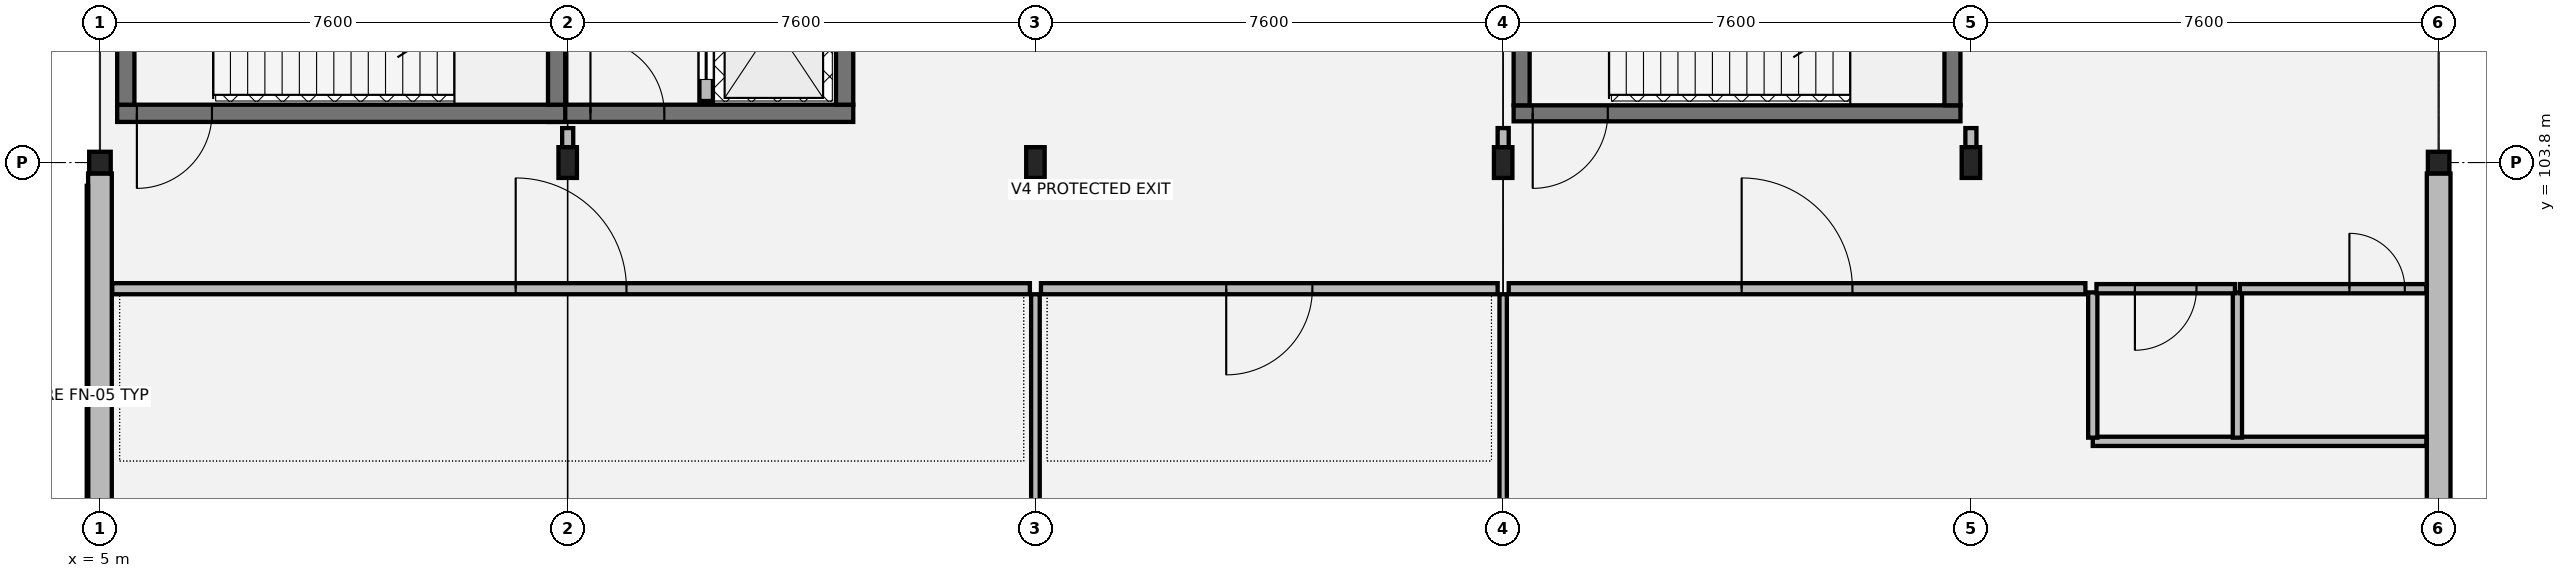
"""IFC4 building model, lengths in metres.
Left out: names, types, materials, properties, quantities, classifications, styles, units other than length and angle.
Written with IfcOpenShell. Run it as: python <this file> out.ifc"""

import sys

from ifc_helpers import new_model, si_unit, direction, frame, frame_2d, origin, origin_2d, place, context, subcontext, project, spatial, rectangle, hollow_rectangle, i_section, extrude, element, fill, save


model = new_model("IFC4")
c1 = context("Model", 3, precision=1e-05, world=origin(), true_north=direction((0.0, 1.0)))
c2 = subcontext(c1, "Body", "Model", "MODEL_VIEW")
j1 = project(units=[si_unit("LENGTHUNIT", "METRE"), si_unit("PLANEANGLEUNIT", "RADIAN")], contexts=[c1])
p1 = place(None, origin())
s1 = spatial("IfcSite", under=j1, at=p1, CompositionType="ELEMENT")
p2 = place(p1, origin())
s2 = spatial("IfcBuilding", under=s1, at=p2, CompositionType="ELEMENT")
p3 = place(p2, origin())
s3 = spatial("IfcBuildingStorey", under=s2, at=p3, CompositionType="ELEMENT", Elevation=0.0)
p4 = place(p3, frame((5.0, 103.8, 0.0), z_axis=(0.0, 0.0, 1.0), x_axis=(1.0, 0.0, 0.0)))
e1 = element("IfcColumn", 1, at=p4, inside=s3, PredefinedType="COLUMN", context=c2, shape_type="SweptSolid", body=[
    extrude(hollow_rectangle(XDim=0.35, YDim=0.35, WallThickness=0.014, at=origin_2d()), origin(), (0.0, 0.0, 1.0), 5.075),
])
for number, where, z_axis, x_axis in (
    (2, (12.6, 103.8, 0.0), (0.0, 0.0, 1.0), (1.0, 0.0, 0.0)),
    (3, (20.2, 103.8, 0.0), (0.0, 0.0, 1.0), (1.0, 0.0, 0.0)),
    (4, (27.8, 103.8, 0.0), (0.0, 0.0, 1.0), (1.0, 0.0, 0.0)),
    (5, (35.4, 103.8, 0.0), (0.0, 0.0, 1.0), (1.0, 0.0, 0.0)),
):
    element("IfcColumn", number, at=place(p3, frame(where, z_axis=z_axis, x_axis=x_axis)), inside=s3, PredefinedType="COLUMN", context=c2, shape_type="SweptSolid", body=[
        extrude(i_section(OverallWidth=0.3, OverallDepth=0.5, WebThickness=0.014, FlangeThickness=0.028, at=origin_2d()), origin(), (0.0, 0.0, 1.0), 5.075),
    ])
p5 = place(p3, frame((43.0, 103.8, 0.0), z_axis=(0.0, 0.0, 1.0), x_axis=(1.0, 0.0, 0.0)))
e6 = element("IfcColumn", 6, at=p5, inside=s3, PredefinedType="COLUMN", context=c2, shape_type="SweptSolid", body=[
    extrude(hollow_rectangle(XDim=0.35, YDim=0.35, WallThickness=0.014, at=origin_2d()), origin(), (0.0, 0.0, 1.0), 5.075),
])
for number, where, z_axis, x_axis in (
    (7, (43.0, 96.378, 0.0), (0.0, 0.0, 1.0), (0.0, 1.0, 0.0)),
    (8, (5.0, 103.622, 0.0), (0.0, 0.0, 1.0), (0.0, -1.0, 0.0)),
):
    element("IfcWall", number, at=place(p3, frame(where, z_axis=z_axis, x_axis=x_axis)), inside=s3, PredefinedType="SOLIDWALL", context=c2, shape_type="SweptSolid", body=[
        extrude(rectangle(XDim=7.244, YDim=0.385, at=frame_2d((3.622, 0.0))), origin(), (0.0, 0.0, 1.0), 4.5),
    ])
p6 = place(p3, frame((12.28, 104.6, 0.0), z_axis=(0.0, 0.0, 1.0), x_axis=(1.0, 0.0, 0.0)))
e9 = element("IfcWall", 9, at=p6, inside=s3, PredefinedType="SHEAR", context=c2, shape_type="SweptSolid", body=[
    extrude(rectangle(XDim=4.96, YDim=0.28, at=frame_2d((2.48, 0.0))), origin(), (0.0, 0.0, 1.0), 4.865),
])
p7 = place(p6, frame((0.69, 0.0, 0.0)))
e10 = element("IfcOpeningElement", 10, at=p7, cuts=e9, PredefinedType="OPENING", context=c2, shape_type="SweptSolid", body=[
    extrude(rectangle(XDim=1.2, YDim=2.16, at=frame_2d((0.6, 1.08))), frame((0.0, 0.15, 0.0), z_axis=(0.0, -1.0, 0.0), x_axis=(1.0, 0.0, 0.0)), (0.0, 0.0, 1.0), 0.3),
])
p8 = place(p3, frame((17.1, 104.74, 0.0), z_axis=(0.0, 0.0, 1.0), x_axis=(0.0, 1.0, 0.0)))
e11 = element("IfcWall", 11, at=p8, inside=s3, PredefinedType="SHEAR", context=c2, shape_type="SweptSolid", body=[
    extrude(rectangle(XDim=5.72, YDim=0.28, at=frame_2d((2.86, 0.0))), origin(), (0.0, 0.0, 1.0), 4.865),
])
p9 = place(p3, frame((14.85, 104.8, 0.0), z_axis=(0.0, 0.0, 1.0), x_axis=(0.0, 1.0, 0.0)))
e12 = element("IfcWall", 12, at=p9, inside=s3, PredefinedType="SOLIDWALL", context=c2, shape_type="SweptSolid", body=[
    extrude(rectangle(XDim=5.6, YDim=0.22, at=frame_2d((2.8, 0.0))), origin(), (0.0, 0.0, 1.0), 4.865),
])
p10 = place(p9, frame((0.35, 0.0, 0.0)))
e13 = element("IfcOpeningElement", 13, at=p10, cuts=e12, PredefinedType="OPENING", context=c2, shape_type="SweptSolid", body=[
    extrude(rectangle(XDim=1.1, YDim=2.15, at=frame_2d((0.55, 1.075))), frame((0.0, 0.12, 0.0), z_axis=(0.0, -1.0, 0.0), x_axis=(1.0, 0.0, 0.0)), (0.0, 0.0, 1.0), 0.24),
])
p11 = place(p3, frame((5.28, 104.6, 0.0), z_axis=(0.0, 0.0, 1.0), x_axis=(1.0, 0.0, 0.0)))
e14 = element("IfcWall", 14, at=p11, inside=s3, PredefinedType="SHEAR", context=c2, shape_type="SweptSolid", body=[
    extrude(rectangle(XDim=7.28, YDim=0.28, at=frame_2d((3.64, 0.0))), origin(), (0.0, 0.0, 1.0), 4.865),
])
p12 = place(p11, frame((0.32, 0.0, 0.0)))
e15 = element("IfcOpeningElement", 15, at=p12, cuts=e14, PredefinedType="OPENING", context=c2, shape_type="SweptSolid", body=[
    extrude(rectangle(XDim=1.22, YDim=2.18, at=frame_2d((0.61, 1.09))), frame((0.0, 0.15, 0.0), z_axis=(0.0, -1.0, 0.0), x_axis=(1.0, 0.0, 0.0)), (0.0, 0.0, 1.0), 0.3),
])
for number, where, z_axis, x_axis in (
    (16, (5.42, 104.74, 0.0), (0.0, 0.0, 1.0), (0.0, 1.0, 0.0)),
    (17, (12.42, 104.74, 0.0), (0.0, 0.0, 1.0), (0.0, 1.0, 0.0)),
):
    element("IfcWall", number, at=place(p3, frame(where, z_axis=z_axis, x_axis=x_axis)), inside=s3, PredefinedType="SHEAR", context=c2, shape_type="SweptSolid", body=[
        extrude(rectangle(XDim=5.72, YDim=0.28, at=frame_2d((2.86, 0.0))), origin(), (0.0, 0.0, 1.0), 4.865),
    ])
p13 = place(p3, frame((27.97, 104.6, 0.0), z_axis=(0.0, 0.0, 1.0), x_axis=(1.0, 0.0, 0.0)))
e18 = element("IfcWall", 18, at=p13, inside=s3, PredefinedType="SHEAR", context=c2, shape_type="SweptSolid", body=[
    extrude(rectangle(XDim=7.26, YDim=0.26, at=frame_2d((3.63, 0.0))), origin(), (0.0, 0.0, 1.0), 4.865),
])
p14 = place(p13, frame((0.31, 0.0, 0.0)))
e19 = element("IfcOpeningElement", 19, at=p14, cuts=e18, PredefinedType="OPENING", context=c2, shape_type="SweptSolid", body=[
    extrude(rectangle(XDim=1.22, YDim=2.18, at=frame_2d((0.61, 1.09))), frame((0.0, 0.14, 0.0), z_axis=(0.0, -1.0, 0.0), x_axis=(1.0, 0.0, 0.0)), (0.0, 0.0, 1.0), 0.28),
])
for number, where, z_axis, x_axis in (
    (20, (28.1, 104.73, 0.0), (0.0, 0.0, 1.0), (0.0, 1.0, 0.0)),
    (21, (35.1, 104.73, 0.0), (0.0, 0.0, 1.0), (0.0, 1.0, 0.0)),
):
    element("IfcWall", number, at=place(p3, frame(where, z_axis=z_axis, x_axis=x_axis)), inside=s3, PredefinedType="SHEAR", context=c2, shape_type="SweptSolid", body=[
        extrude(rectangle(XDim=5.74, YDim=0.26, at=frame_2d((2.87, 0.0))), origin(), (0.0, 0.0, 1.0), 4.865),
    ])
p15 = place(p3, frame((37.38, 99.27, 0.0), z_axis=(0.0, 0.0, 1.0), x_axis=(1.0, 0.0, 0.0)))
e22 = element("IfcWall", 22, at=p15, inside=s3, PredefinedType="PARTITIONING", context=c2, shape_type="SweptSolid", body=[
    extrude(rectangle(XDim=5.42, YDim=0.15, at=frame_2d((2.71, 0.0))), origin(), (0.0, 0.0, 1.0), 4.2),
])
for number, where, z_axis, x_axis in (
    (23, (37.38, 99.33, 0.0), (0.0, 0.0, 1.0), (0.0, 1.0, 0.0)),
    (24, (39.73, 99.33, 0.0), (0.0, 0.0, 1.0), (0.0, 1.0, 0.0)),
):
    element("IfcWall", number, at=place(p3, frame(where, z_axis=z_axis, x_axis=x_axis)), inside=s3, PredefinedType="PARTITIONING", context=c2, shape_type="SweptSolid", body=[
        extrude(rectangle(XDim=2.36, YDim=0.15, at=frame_2d((1.18, 0.0))), origin(), (0.0, 0.0, 1.0), 4.2),
    ])
p16 = place(p3, frame((37.44, 101.75, 0.0), z_axis=(0.0, 0.0, 1.0), x_axis=(1.0, 0.0, 0.0)))
e25 = element("IfcWall", 25, at=p16, inside=s3, PredefinedType="PARTITIONING", context=c2, shape_type="SweptSolid", body=[
    extrude(rectangle(XDim=2.25, YDim=0.15, at=frame_2d((1.125, 0.0))), origin(), (0.0, 0.0, 1.0), 4.2),
])
p17 = place(p16, frame((0.625, 0.0, 0.0)))
e26 = element("IfcOpeningElement", 26, at=p17, cuts=e25, PredefinedType="OPENING", context=c2, shape_type="SweptSolid", body=[
    extrude(rectangle(XDim=1.0, YDim=2.15, at=frame_2d((0.5, 1.075))), frame((0.0, 0.085, 0.0), z_axis=(0.0, -1.0, 0.0), x_axis=(1.0, 0.0, 0.0)), (0.0, 0.0, 1.0), 0.17),
])
p18 = place(p3, frame((39.77, 101.75, 0.0), z_axis=(0.0, 0.0, 1.0), x_axis=(1.0, 0.0, 0.0)))
e27 = element("IfcWall", 27, at=p18, inside=s3, PredefinedType="PARTITIONING", context=c2, shape_type="SweptSolid", body=[
    extrude(rectangle(XDim=3.03, YDim=0.15, at=frame_2d((1.515, 0.0))), origin(), (0.0, 0.0, 1.0), 4.2),
])
p19 = place(p18, frame((1.78, 0.0, 0.0)))
e28 = element("IfcOpeningElement", 28, at=p19, cuts=e27, PredefinedType="OPENING", context=c2, shape_type="SweptSolid", body=[
    extrude(rectangle(XDim=0.9, YDim=2.15, at=frame_2d((0.45, 1.075))), frame((0.0, 0.085, 0.0), z_axis=(0.0, -1.0, 0.0), x_axis=(1.0, 0.0, 0.0)), (0.0, 0.0, 1.0), 0.17),
])
p20 = place(p3, frame((5.2, 101.75, 0.0), z_axis=(0.0, 0.0, 1.0), x_axis=(1.0, 0.0, 0.0)))
e29 = element("IfcWall", 29, at=p20, inside=s3, PredefinedType="PARTITIONING", context=c2, shape_type="SweptSolid", body=[
    extrude(rectangle(XDim=14.91, YDim=0.18, at=frame_2d((7.455, 0.0))), origin(), (0.0, 0.0, 1.0), 4.2),
])
p21 = place(p20, frame((6.555, 0.0, 0.0)))
e30 = element("IfcOpeningElement", 30, at=p21, cuts=e29, PredefinedType="OPENING", context=c2, shape_type="SweptSolid", body=[
    extrude(rectangle(XDim=1.8, YDim=2.3, at=frame_2d((0.9, 1.15))), frame((0.0, 0.1, 0.0), z_axis=(0.0, -1.0, 0.0), x_axis=(1.0, 0.0, 0.0)), (0.0, 0.0, 1.0), 0.2),
])
p22 = place(p3, frame((20.29, 101.75, 0.0), z_axis=(0.0, 0.0, 1.0), x_axis=(1.0, 0.0, 0.0)))
e31 = element("IfcWall", 31, at=p22, inside=s3, PredefinedType="PARTITIONING", context=c2, shape_type="SweptSolid", body=[
    extrude(rectangle(XDim=7.42, YDim=0.18, at=frame_2d((3.71, 0.0))), origin(), (0.0, 0.0, 1.0), 4.2),
])
p23 = place(p22, frame((3.01, 0.0, 0.0)))
e32 = element("IfcOpeningElement", 32, at=p23, cuts=e31, PredefinedType="OPENING", context=c2, shape_type="SweptSolid", body=[
    extrude(rectangle(XDim=1.4, YDim=2.22, at=frame_2d((0.7, 1.11))), frame((0.0, 0.1, 0.0), z_axis=(0.0, -1.0, 0.0), x_axis=(1.0, 0.0, 0.0)), (0.0, 0.0, 1.0), 0.2),
])
p24 = place(p3, frame((27.89, 101.75, 0.0), z_axis=(0.0, 0.0, 1.0), x_axis=(1.0, 0.0, 0.0)))
e33 = element("IfcWall", 33, at=p24, inside=s3, PredefinedType="PARTITIONING", context=c2, shape_type="SweptSolid", body=[
    extrude(rectangle(XDim=9.37, YDim=0.18, at=frame_2d((4.685, 0.0))), origin(), (0.0, 0.0, 1.0), 4.2),
])
p25 = place(p24, frame((3.785, 0.0, 0.0)))
e34 = element("IfcOpeningElement", 34, at=p25, cuts=e33, PredefinedType="OPENING", context=c2, shape_type="SweptSolid", body=[
    extrude(rectangle(XDim=1.8, YDim=2.3, at=frame_2d((0.9, 1.15))), frame((0.0, 0.1, 0.0), z_axis=(0.0, -1.0, 0.0), x_axis=(1.0, 0.0, 0.0)), (0.0, 0.0, 1.0), 0.2),
])
for number, where, z_axis, x_axis in (
    (35, (12.6, 104.04, 0.0), (0.0, 0.0, 1.0), (0.0, 1.0, 0.0)),
    (36, (27.8, 104.04, 0.0), (0.0, 0.0, 1.0), (0.0, 1.0, 0.0)),
    (37, (35.4, 104.04, 0.0), (0.0, 0.0, 1.0), (0.0, 1.0, 0.0)),
):
    element("IfcWall", number, at=place(p3, frame(where, z_axis=z_axis, x_axis=x_axis)), inside=s3, PredefinedType="PARTITIONING", context=c2, shape_type="SweptSolid", body=[
        extrude(rectangle(XDim=0.32, YDim=0.18, at=frame_2d((0.16, 0.0))), origin(), (0.0, 0.0, 1.0), 4.2),
    ])
p26 = place(p3, frame((20.2, 73.72, 0.0), z_axis=(0.0, 0.0, 1.0), x_axis=(0.0, 1.0, 0.0)))
e38 = element("IfcWall", 38, at=p26, inside=s3, PredefinedType="PARTITIONING", context=c2, shape_type="SweptSolid", body=[
    extrude(rectangle(XDim=27.94, YDim=0.14, at=frame_2d((13.97, 0.0))), origin(), (0.0, 0.0, 1.0), 4.2),
])
p27 = place(p3, frame((27.8, 73.72, 0.0), z_axis=(0.0, 0.0, 1.0), x_axis=(0.0, 1.0, 0.0)))
e39 = element("IfcWall", 39, at=p27, inside=s3, PredefinedType="PARTITIONING", context=c2, shape_type="SweptSolid", body=[
    extrude(rectangle(XDim=27.94, YDim=0.12, at=frame_2d((13.97, 0.0))), origin(), (0.0, 0.0, 1.0), 4.2),
])
p28 = place(p7, origin())
e40 = element("IfcDoor", 40, at=p28, inside=s3, OperationType="SINGLE_SWING_LEFT", PredefinedType="DOOR", context=c2, shape_type="SweptSolid", body=[
    extrude(rectangle(XDim=1.2, YDim=2.16, at=frame_2d((0.6, 1.08))), frame((0.0, 0.025, 0.0), z_axis=(0.0, -1.0, 0.0), x_axis=(1.0, 0.0, 0.0)), (0.0, 0.0, 1.0), 0.05),
])
fill(e10, e40)
p29 = place(p10, origin())
e41 = element("IfcDoor", 41, at=p29, inside=s3, OperationType="SLIDING_TO_LEFT", PredefinedType="DOOR", context=c2, shape_type="SweptSolid", body=[
    extrude(rectangle(XDim=1.1, YDim=2.15, at=frame_2d((0.55, 1.075))), frame((0.0, 0.025, 0.0), z_axis=(0.0, -1.0, 0.0), x_axis=(1.0, 0.0, 0.0)), (0.0, 0.0, 1.0), 0.05),
])
fill(e13, e41)
p30 = place(p12, origin())
e42 = element("IfcDoor", 42, at=p30, inside=s3, OperationType="SINGLE_SWING_RIGHT", PredefinedType="DOOR", context=c2, shape_type="SweptSolid", body=[
    extrude(rectangle(XDim=1.22, YDim=2.18, at=frame_2d((0.61, 1.09))), frame((0.0, 0.025, 0.0), z_axis=(0.0, -1.0, 0.0), x_axis=(1.0, 0.0, 0.0)), (0.0, 0.0, 1.0), 0.05),
])
fill(e15, e42)
p31 = place(p14, origin())
e43 = element("IfcDoor", 43, at=p31, inside=s3, OperationType="SINGLE_SWING_RIGHT", PredefinedType="DOOR", context=c2, shape_type="SweptSolid", body=[
    extrude(rectangle(XDim=1.22, YDim=2.18, at=frame_2d((0.61, 1.09))), frame((0.0, 0.025, 0.0), z_axis=(0.0, -1.0, 0.0), x_axis=(1.0, 0.0, 0.0)), (0.0, 0.0, 1.0), 0.05),
])
fill(e19, e43)
p32 = place(p17, origin())
e44 = element("IfcDoor", 44, at=p32, inside=s3, OperationType="SINGLE_SWING_RIGHT", PredefinedType="DOOR", context=c2, shape_type="SweptSolid", body=[
    extrude(rectangle(XDim=1.0, YDim=2.15, at=frame_2d((0.5, 1.075))), frame((0.0, 0.025, 0.0), z_axis=(0.0, -1.0, 0.0), x_axis=(1.0, 0.0, 0.0)), (0.0, 0.0, 1.0), 0.05),
])
fill(e26, e44)
p33 = place(p19, origin())
e45 = element("IfcDoor", 45, at=p33, inside=s3, OperationType="SINGLE_SWING_LEFT", PredefinedType="DOOR", context=c2, shape_type="SweptSolid", body=[
    extrude(rectangle(XDim=0.9, YDim=2.15, at=frame_2d((0.45, 1.075))), frame((0.0, 0.025, 0.0), z_axis=(0.0, -1.0, 0.0), x_axis=(1.0, 0.0, 0.0)), (0.0, 0.0, 1.0), 0.05),
])
fill(e28, e45)
p34 = place(p21, origin())
e46 = element("IfcDoor", 46, at=p34, inside=s3, OperationType="DOUBLE_DOOR_SINGLE_SWING", PredefinedType="DOOR", context=c2, shape_type="SweptSolid", body=[
    extrude(rectangle(XDim=1.8, YDim=2.3, at=frame_2d((0.9, 1.15))), frame((0.0, 0.025, 0.0), z_axis=(0.0, -1.0, 0.0), x_axis=(1.0, 0.0, 0.0)), (0.0, 0.0, 1.0), 0.05),
])
fill(e30, e46)
p35 = place(p23, origin())
e47 = element("IfcDoor", 47, at=p35, inside=s3, OperationType="SINGLE_SWING_RIGHT", PredefinedType="DOOR", context=c2, shape_type="SweptSolid", body=[
    extrude(rectangle(XDim=1.4, YDim=2.22, at=frame_2d((0.7, 1.11))), frame((0.0, 0.025, 0.0), z_axis=(0.0, -1.0, 0.0), x_axis=(1.0, 0.0, 0.0)), (0.0, 0.0, 1.0), 0.05),
])
fill(e32, e47)
p36 = place(p25, origin())
e48 = element("IfcDoor", 48, at=p36, inside=s3, OperationType="DOUBLE_DOOR_SINGLE_SWING", PredefinedType="DOOR", context=c2, shape_type="SweptSolid", body=[
    extrude(rectangle(XDim=1.8, YDim=2.3, at=frame_2d((0.9, 1.15))), frame((0.0, 0.025, 0.0), z_axis=(0.0, -1.0, 0.0), x_axis=(1.0, 0.0, 0.0)), (0.0, 0.0, 1.0), 0.05),
])
fill(e34, e48)
save(model, sys.argv[1])
